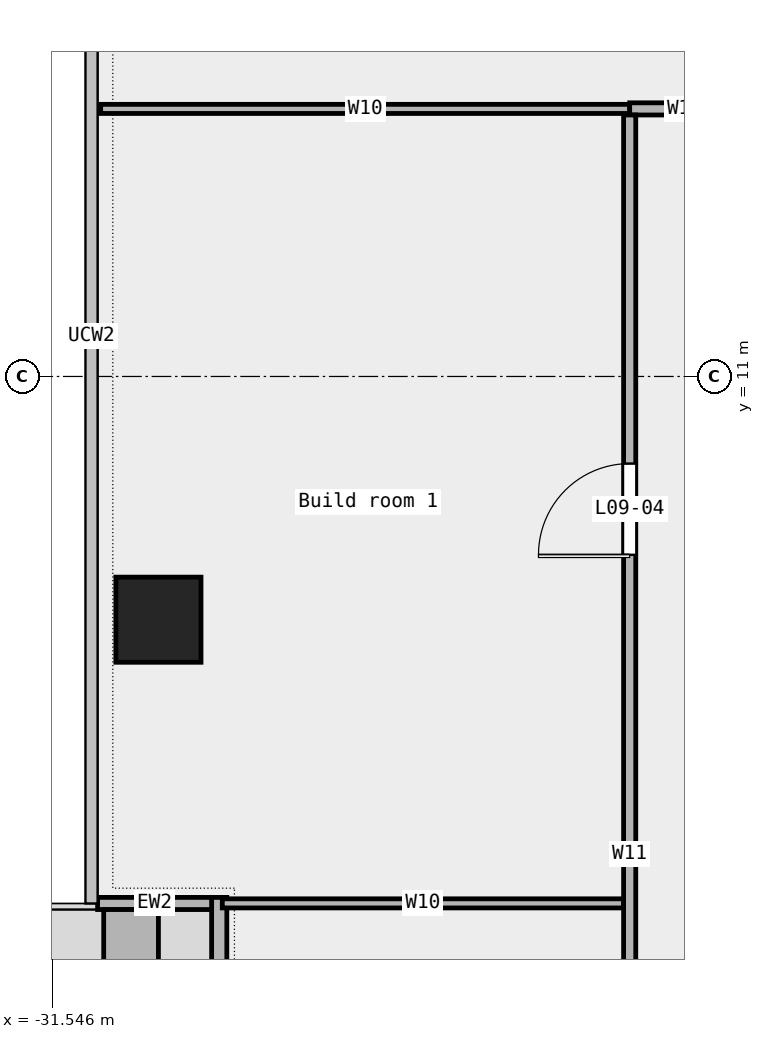
"""IFC4 building model, lengths in metres.
Left out: names, types, materials, properties, quantities, classifications, styles, units other than length and angle.
Written with IfcOpenShell. Run it as: python <this file> out.ifc"""

import sys

from ifc_helpers import new_model, si_unit, direction, frame, frame_2d, origin, origin_2d, place, context, subcontext, project, spatial, rectangle, extrude, element, fill, save


model = new_model("IFC4")
c1 = context("Model", 3, precision=1e-05, world=origin(), true_north=direction((0.0, 1.0)))
c2 = subcontext(c1, "Body", "Model", "MODEL_VIEW")
j1 = project(units=[si_unit("LENGTHUNIT", "METRE"), si_unit("PLANEANGLEUNIT", "RADIAN")], contexts=[c1])
p1 = place(None, origin())
s1 = spatial("IfcSite", under=j1, at=p1, CompositionType="ELEMENT")
p2 = place(p1, origin())
s2 = spatial("IfcBuilding", under=s1, at=p2, CompositionType="ELEMENT")
p3 = place(p2, frame((0.0, 0.0, 50.2)))
s3 = spatial("IfcBuildingStorey", under=s2, at=p3, CompositionType="ELEMENT", Elevation=50.2)
p4 = place(p3, frame((-29.8, 7.0, 0.0), z_axis=(0.0, 0.0, 1.0), x_axis=(1.0, 0.0, 0.0)))
e1 = element("IfcColumn", 1, at=p4, inside=s3, PredefinedType="COLUMN", context=c2, shape_type="SweptSolid", body=[
    extrude(rectangle(XDim=1.4, YDim=1.4, at=origin_2d()), origin(), (0.0, 0.0, 1.0), 4.35),
])
p5 = place(p3, frame((-28.8, 2.433, 0.0), z_axis=(0.0, 0.0, 1.0), x_axis=(0.0, -1.0, 0.0)))
e2 = element("IfcWall", 2, at=p5, inside=s3, PredefinedType="STANDARD", context=c2, shape_type="SweptSolid", body=[
    extrude(rectangle(XDim=14.2, YDim=0.25, at=frame_2d((7.1, 0.0))), origin(), (0.0, 0.0, 1.0), 4.35),
])
p6 = place(p5, frame((1.75, 0.0, 0.45)))
e3 = element("IfcOpeningElement", 3, at=p6, cuts=e2, PredefinedType="OPENING", context=c2, shape_type="SweptSolid", body=[
    extrude(rectangle(XDim=1.5, YDim=3.0, at=frame_2d((0.75, 1.5))), frame((0.0, 0.137, 0.0), z_axis=(0.0, -1.0, 0.0), x_axis=(1.0, 0.0, 0.0)), (0.0, 0.0, 1.0), 0.274),
])
p7 = place(p5, frame((6.25, 0.0, 0.0)))
e4 = element("IfcOpeningElement", 4, at=p7, cuts=e2, PredefinedType="OPENING", context=c2, shape_type="SweptSolid", body=[
    extrude(rectangle(XDim=1.8, YDim=2.4, at=frame_2d((0.9, 1.2))), frame((0.0, 0.137, 0.0), z_axis=(0.0, -1.0, 0.0), x_axis=(1.0, 0.0, 0.0)), (0.0, 0.0, 1.0), 0.274),
])
p8 = place(p5, frame((11.0, 0.0, 0.45)))
e5 = element("IfcOpeningElement", 5, at=p8, cuts=e2, PredefinedType="OPENING", context=c2, shape_type="SweptSolid", body=[
    extrude(rectangle(XDim=1.5, YDim=3.0, at=frame_2d((0.75, 1.5))), frame((0.0, 0.137, 0.0), z_axis=(0.0, -1.0, 0.0), x_axis=(1.0, 0.0, 0.0)), (0.0, 0.0, 1.0), 0.274),
])
p9 = place(p3, frame((-30.8, 2.333, 0.0), z_axis=(0.0, 0.0, 1.0), x_axis=(1.0, 0.0, 0.0)))
e6 = element("IfcWall", 6, at=p9, inside=s3, PredefinedType="STANDARD", context=c2, shape_type="SweptSolid", body=[
    extrude(rectangle(XDim=1.875, YDim=0.2, at=frame_2d((0.938, 0.0))), origin(), (0.0, 0.0, 1.0), 4.35),
])
p10 = place(p3, frame((-30.25, 2.233, 0.0), z_axis=(0.0, 0.0, 1.0), x_axis=(0.0, -1.0, 0.0)))
e7 = element("IfcWall", 7, at=p10, inside=s3, PredefinedType="STANDARD", context=c2, shape_type="SweptSolid", body=[
    extrude(rectangle(XDim=3.6, YDim=0.9, at=frame_2d((1.8, 0.0))), origin(), (0.0, 0.0, 1.0), 0.7),
])
p11 = place(p3, frame((-28.75, 2.335, 0.0), z_axis=(0.0, 0.0, 1.0), x_axis=(1.0, 0.0, 0.0)))
e8 = element("IfcWall", 8, at=p11, inside=s3, PredefinedType="PARTITIONING", context=c2, shape_type="SweptSolid", body=[
    extrude(rectangle(XDim=6.6, YDim=0.15, at=frame_2d((3.3, 0.0))), origin(), (0.0, 0.0, 1.0), 4.35),
])
p12 = place(p3, frame((-30.75, 15.4, 0.0), z_axis=(0.0, 0.0, 1.0), x_axis=(1.0, 0.0, 0.0)))
e9 = element("IfcWall", 9, at=p12, inside=s3, PredefinedType="PARTITIONING", context=c2, shape_type="SweptSolid", body=[
    extrude(rectangle(XDim=8.7, YDim=0.15, at=frame_2d((4.35, 0.0))), origin(), (0.0, 0.0, 1.0), 4.35),
])
p13 = place(p3, frame((-22.05, 15.4, 0.0), z_axis=(0.0, 0.0, 1.0), x_axis=(1.0, 0.0, 0.0)))
e10 = element("IfcWall", 10, at=p13, inside=s3, PredefinedType="PARTITIONING", context=c2, shape_type="SweptSolid", body=[
    extrude(rectangle(XDim=1.8, YDim=0.2, at=frame_2d((0.9, 0.0))), origin(), (0.0, 0.0, 1.0), 4.35),
])
p14 = place(p3, frame((-22.05, -9.0, 0.0), z_axis=(0.0, 0.0, 1.0), x_axis=(0.0, 1.0, 0.0)))
e11 = element("IfcWall", 11, at=p14, inside=s3, PredefinedType="PARTITIONING", context=c2, shape_type="SweptSolid", body=[
    extrude(rectangle(XDim=24.3, YDim=0.2, at=frame_2d((12.15, 0.0))), origin(), (0.0, 0.0, 1.0), 4.35),
])
p15 = place(p14, frame((17.067, 0.0, 0.0)))
e12 = element("IfcOpeningElement", 12, at=p15, cuts=e11, PredefinedType="OPENING", context=c2, shape_type="SweptSolid", body=[
    extrude(rectangle(XDim=1.5, YDim=2.1, at=frame_2d((0.75, 1.05))), frame((0.0, 0.112, 0.0), z_axis=(0.0, -1.0, 0.0), x_axis=(1.0, 0.0, 0.0)), (0.0, 0.0, 1.0), 0.224),
])
p16 = place(p14, frame((4.768, 0.0, 0.0)))
e13 = element("IfcOpeningElement", 13, at=p16, cuts=e11, PredefinedType="OPENING", context=c2, shape_type="SweptSolid", body=[
    extrude(rectangle(XDim=1.8, YDim=2.1, at=frame_2d((0.9, 1.05))), frame((0.0, 0.112, 0.0), z_axis=(0.0, -1.0, 0.0), x_axis=(1.0, 0.0, 0.0)), (0.0, 0.0, 1.0), 0.224),
])
p17 = place(p15, origin())
e14 = element("IfcDoor", 14, at=p17, inside=s3, OperationType="DOUBLE_DOOR_SINGLE_SWING", PredefinedType="DOOR", context=c2, shape_type="SweptSolid", body=[
    extrude(rectangle(XDim=1.5, YDim=2.1, at=frame_2d((0.75, 1.05))), frame((0.0, 0.025, 0.0), z_axis=(0.0, -1.0, 0.0), x_axis=(1.0, 0.0, 0.0)), (0.0, 0.0, 1.0), 0.05),
])
fill(e12, e14)
save(model, sys.argv[1])
